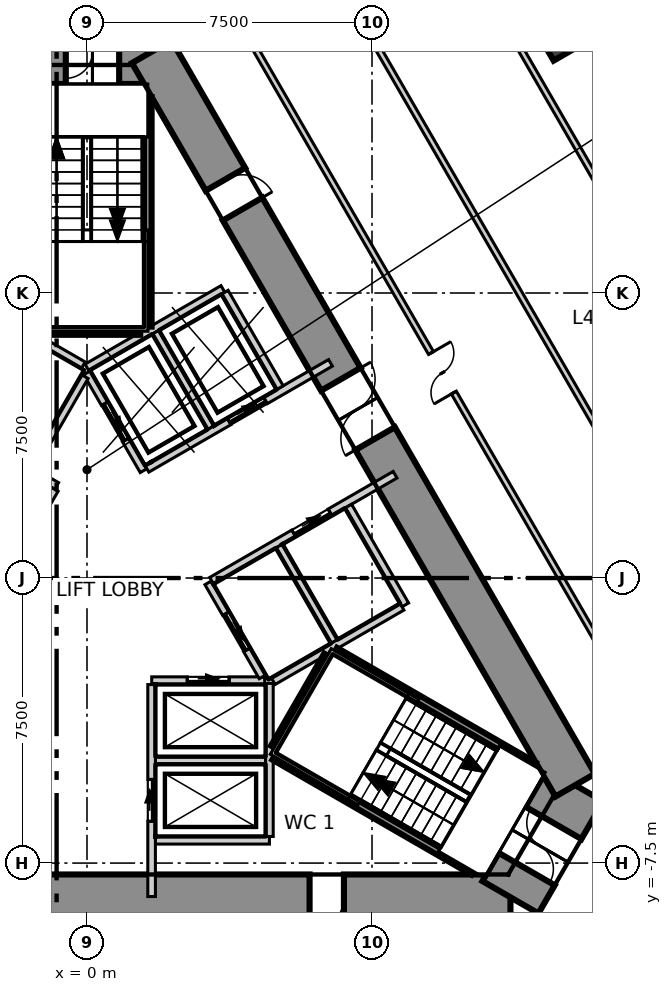
"""IFC4 building model, lengths in metres.
Left out: names, types, materials, properties, quantities, classifications, styles, units other than length and angle.
Written with IfcOpenShell. Run it as: python <this file> out.ifc"""

import sys

from ifc_helpers import new_model, si_unit, direction, frame, frame_2d, origin, origin_2d, place, context, subcontext, project, spatial, polyline, rectangle, outline, extrude, element, fill, save


model = new_model("IFC4")
c1 = context("Model", 3, precision=1e-05, world=origin(), true_north=direction((0.0, 1.0)))
c2 = subcontext(c1, "Body", "Model", "MODEL_VIEW")
j1 = project(units=[si_unit("LENGTHUNIT", "METRE"), si_unit("PLANEANGLEUNIT", "RADIAN")], contexts=[c1])
p1 = place(None, origin())
s1 = spatial("IfcSite", under=j1, at=p1, CompositionType="ELEMENT")
p2 = place(p1, origin())
s2 = spatial("IfcBuilding", under=s1, at=p2, CompositionType="ELEMENT")
p3 = place(p2, frame((0.0, 0.0, 185.3)))
s3 = spatial("IfcBuildingStorey", under=s2, at=p3, CompositionType="ELEMENT", Elevation=185.3)
p4 = place(p3, frame((1.703, 13.85, -0.6), z_axis=(0.0, 0.0, 1.0), x_axis=(-1.0, 0.0, 0.0)))
e1 = element("IfcWall", 1, at=p4, inside=s3, PredefinedType="SHEAR", context=c2, shape_type="SweptSolid", body=[
    extrude(outline(polyline([(-0.202, -0.85), (1.703, -0.85), (3.608, -0.85), (3.204, 0.85), (1.703, 0.85), (0.202, 0.85), (-0.202, -0.85)])), origin(), (0.0, 0.0, 1.0), 6.3),
])
p5 = place(p4, frame((0.859, 0.0, 0.6)))
e2 = element("IfcOpeningElement", 2, at=p5, cuts=e1, PredefinedType="OPENING", context=c2, shape_type="SweptSolid", body=[
    extrude(rectangle(XDim=1.4, YDim=2.1, at=frame_2d((0.7, 1.05))), frame((0.0, 0.86, 0.0), z_axis=(0.0, -1.0, 0.0), x_axis=(1.0, 0.0, 0.0)), (0.0, 0.0, 1.0), 1.72),
])
p6 = place(p3, frame((-11.143, -8.4, -0.6), z_axis=(0.0, 0.0, 1.0), x_axis=(1.0, 0.0, 0.0)))
e3 = element("IfcWall", 3, at=p6, inside=s3, PredefinedType="SHEAR", context=c2, shape_type="SweptSolid", body=[
    extrude(outline(polyline([(-0.635, -0.6), (1.328, -0.6), (3.291, -0.6), (5.254, -0.6), (7.217, -0.6), (9.18, -0.6), (11.143, -0.6), (13.106, -0.6), (15.069, -0.6), (17.032, -0.6), (18.995, -0.6), (20.958, -0.6), (22.921, -0.6), (21.651, 0.6), (19.74, 0.6), (17.83, 0.6), (15.919, 0.6), (14.009, 0.6), (12.098, 0.6), (10.188, 0.6), (8.277, 0.6), (6.367, 0.6), (4.456, 0.6), (2.546, 0.6), (0.635, 0.6), (-0.635, -0.6)])), origin(), (0.0, 0.0, 1.0), 6.3),
])
p7 = place(p6, frame((17.002, 0.0, 0.6)))
e4 = element("IfcOpeningElement", 4, at=p7, cuts=e3, PredefinedType="OPENING", context=c2, shape_type="SweptSolid", body=[
    extrude(rectangle(XDim=0.9, YDim=2.1, at=frame_2d((0.45, 1.05))), frame((0.0, 0.61, 0.0), z_axis=(0.0, -1.0, 0.0), x_axis=(1.0, 0.0, 0.0)), (0.0, 0.0, 1.0), 1.22),
])
p8 = place(p3, frame((11.143, -8.4, -0.6), z_axis=(0.0, 0.0, 1.0), x_axis=(0.499939613464, 0.86606026516, 0.0)))
e5 = element("IfcWall", 5, at=p8, inside=s3, PredefinedType="SHEAR", context=c2, shape_type="SweptSolid", body=[
    extrude(outline(polyline([(-0.202, -0.85), (1.703, -0.85), (3.608, -0.85), (3.204, 0.85), (1.703, 0.85), (0.202, 0.85), (-0.202, -0.85)])), origin(), (0.0, 0.0, 1.0), 6.3),
])
p9 = place(p8, frame((0.859, 0.0, 0.6)))
e6 = element("IfcOpeningElement", 6, at=p9, cuts=e5, PredefinedType="OPENING", context=c2, shape_type="SweptSolid", body=[
    extrude(rectangle(XDim=1.4, YDim=2.1, at=frame_2d((0.7, 1.05))), frame((0.0, 0.86, 0.0), z_axis=(0.0, -1.0, 0.0), x_axis=(1.0, 0.0, 0.0)), (0.0, 0.0, 1.0), 1.72),
])
p10 = place(p3, frame((12.846, -5.45, -0.6), z_axis=(0.0, 0.0, 1.0), x_axis=(-0.500005991004, 0.866021944849, 0.0)))
e7 = element("IfcWall", 7, at=p10, inside=s3, PredefinedType="SHEAR", context=c2, shape_type="SweptSolid", body=[
    extrude(outline(polyline([(-0.635, -0.6), (1.328, -0.6), (3.291, -0.6), (5.254, -0.6), (7.217, -0.6), (9.18, -0.6), (11.143, -0.6), (13.106, -0.6), (15.069, -0.6), (17.032, -0.6), (18.995, -0.6), (20.958, -0.6), (22.921, -0.6), (21.651, 0.6), (19.74, 0.6), (17.83, 0.6), (15.919, 0.6), (14.009, 0.6), (12.098, 0.6), (10.188, 0.6), (8.277, 0.6), (6.367, 0.6), (4.456, 0.6), (2.546, 0.6), (0.635, 0.6), (-0.635, -0.6)])), origin(), (0.0, 0.0, 1.0), 6.3),
])
p11 = place(p10, frame((10.531, 0.0, 0.6)))
e8 = element("IfcOpeningElement", 8, at=p11, cuts=e7, PredefinedType="OPENING", context=c2, shape_type="SweptSolid", body=[
    extrude(rectangle(XDim=1.8, YDim=2.1, at=frame_2d((0.9, 1.05))), frame((0.0, 0.61, 0.0), z_axis=(0.0, -1.0, 0.0), x_axis=(1.0, 0.0, 0.0)), (0.0, 0.0, 1.0), 1.22),
])
p12 = place(p10, frame((17.506, 0.0, 0.6)))
e9 = element("IfcOpeningElement", 9, at=p12, cuts=e7, PredefinedType="OPENING", context=c2, shape_type="SweptSolid", body=[
    extrude(rectangle(XDim=0.9, YDim=2.1, at=frame_2d((0.45, 1.05))), frame((0.0, 0.61, 0.0), z_axis=(0.0, -1.0, 0.0), x_axis=(1.0, 0.0, 0.0)), (0.0, 0.0, 1.0), 1.22),
])
p13 = place(p3, frame((12.387, 14.427, -0.6), z_axis=(0.0, 0.0, 1.0), x_axis=(-0.5, 0.866025403784, 0.0)))
e10 = element("IfcColumn", 10, at=p13, inside=s3, PredefinedType="COLUMN", context=c2, shape_type="SweptSolid", body=[
    extrude(rectangle(XDim=1.3, YDim=1.0, at=origin_2d()), origin(), (0.0, 0.0, 1.0), 6.3),
])
p14 = place(p3, frame((2.98, 28.52, 0.0), z_axis=(0.0, 0.0, 1.0), x_axis=(0.500012382508, -0.866018254622, 0.0)))
e11 = element("IfcWall", 11, at=p14, inside=s3, PredefinedType="PARTITIONING", context=c2, shape_type="SweptSolid", body=[
    extrude(rectangle(XDim=46.505, YDim=0.15, at=frame_2d((23.252, 0.0))), origin(), (0.0, 0.0, 1.0), 5.7),
])
p15 = place(p3, frame((2.944, 16.5, 0.0), z_axis=(0.0, 0.0, 1.0), x_axis=(0.500001499409, -0.866024538099, 0.0)))
e12 = element("IfcWall", 12, at=p15, inside=s3, PredefinedType="PARTITIONING", context=c2, shape_type="SweptSolid", body=[
    extrude(rectangle(XDim=25.548, YDim=0.15, at=frame_2d((12.774, 0.0))), origin(), (0.0, 0.0, 1.0), 5.7),
])
p16 = place(p15, frame((12.217, 0.0, 0.0)))
e13 = element("IfcOpeningElement", 13, at=p16, cuts=e12, PredefinedType="OPENING", context=c2, shape_type="SweptSolid", body=[
    extrude(rectangle(XDim=1.2, YDim=2.1, at=frame_2d((0.6, 1.05))), frame((0.0, 0.085, 0.0), z_axis=(0.0, -1.0, 0.0), x_axis=(1.0, 0.0, 0.0)), (0.0, 0.0, 1.0), 0.17),
])
p17 = place(p3, frame((2.371, 23.093, 0.0), z_axis=(0.0, 0.0, 1.0), x_axis=(0.500006092323, -0.866021886352, 0.0)))
e14 = element("IfcWall", 14, at=p17, inside=s3, PredefinedType="PARTITIONING", context=c2, shape_type="SweptSolid", body=[
    extrude(rectangle(XDim=37.651, YDim=0.15, at=frame_2d((18.826, 0.0))), origin(), (0.0, 0.0, 1.0), 5.7),
])
p18 = place(p3, frame((1.8, -4.8, 0.0), z_axis=(0.0, 0.0, 1.0), x_axis=(1.0, 0.0, 0.0)))
e15 = element("IfcWall", 15, at=p18, inside=s3, PredefinedType="SOLIDWALL", context=c2, shape_type="SweptSolid", body=[
    extrude(rectangle(XDim=2.9, YDim=0.2, at=frame_2d((1.45, 0.0))), origin(), (0.0, 0.0, 1.0), 5.7),
])
p19 = place(p3, frame((1.8, -6.9, 0.0), z_axis=(0.0, 0.0, 1.0), x_axis=(1.0, 0.0, 0.0)))
e16 = element("IfcWall", 16, at=p19, inside=s3, PredefinedType="SOLIDWALL", context=c2, shape_type="SweptSolid", body=[
    extrude(rectangle(XDim=3.0, YDim=0.2, at=frame_2d((1.5, 0.0))), origin(), (0.0, 0.0, 1.0), 5.7),
])
p20 = place(p3, frame((1.703, -2.7, 0.0), z_axis=(0.0, 0.0, 1.0), x_axis=(1.0, 0.0, 0.0)))
e17 = element("IfcWall", 17, at=p20, inside=s3, PredefinedType="SOLIDWALL", context=c2, shape_type="SweptSolid", body=[
    extrude(rectangle(XDim=2.973, YDim=0.2, at=frame_2d((1.487, 0.0))), origin(), (0.0, 0.0, 1.0), 5.7),
])
p21 = place(p20, frame((0.936, 0.0, 0.0)))
e18 = element("IfcOpeningElement", 18, at=p21, cuts=e17, PredefinedType="OPENING", context=c2, shape_type="SweptSolid", body=[
    extrude(rectangle(XDim=1.1, YDim=2.1, at=frame_2d((0.55, 1.05))), frame((0.0, 0.11, 0.0), z_axis=(0.0, -1.0, 0.0), x_axis=(1.0, 0.0, 0.0)), (0.0, 0.0, 1.0), 0.22),
])
p22 = place(p3, frame((-0.002, 5.541, 0.0), z_axis=(0.0, 0.0, 1.0), x_axis=(0.86600155993, 0.500041296494, 0.0)))
e19 = element("IfcWall", 19, at=p22, inside=s3, PredefinedType="SOLIDWALL", context=c2, shape_type="SweptSolid", body=[
    extrude(rectangle(XDim=4.132, YDim=0.2, at=frame_2d((2.066, 0.0))), origin(), (0.0, 0.0, 1.0), 5.7),
])
p23 = place(p3, frame((0.0, 5.4, 0.0), z_axis=(0.0, 0.0, 1.0), x_axis=(0.500103862429, -0.865965430478, 0.0)))
e20 = element("IfcWall", 20, at=p23, inside=s3, PredefinedType="SOLIDWALL", context=c2, shape_type="SweptSolid", body=[
    extrude(rectangle(XDim=2.973, YDim=0.2, at=frame_2d((1.487, 0.0))), origin(), (0.0, 0.0, 1.0), 5.7),
])
p24 = place(p23, frame((0.937, 0.0, 0.0)))
e21 = element("IfcOpeningElement", 21, at=p24, cuts=e20, PredefinedType="OPENING", context=c2, shape_type="SweptSolid", body=[
    extrude(rectangle(XDim=1.1, YDim=2.1, at=frame_2d((0.55, 1.05))), frame((0.0, 0.11, 0.0), z_axis=(0.0, -1.0, 0.0), x_axis=(1.0, 0.0, 0.0)), (0.0, 0.0, 1.0), 0.22),
])
p25 = place(p3, frame((3.19, -0.125, 0.0), z_axis=(0.0, 0.0, 1.0), x_axis=(0.499988658015, -0.866031951983, 0.0)))
e22 = element("IfcWall", 22, at=p25, inside=s3, PredefinedType="SOLIDWALL", context=c2, shape_type="SweptSolid", body=[
    extrude(rectangle(XDim=2.858, YDim=0.2, at=frame_2d((1.429, 0.0))), origin(), (0.0, 0.0, 1.0), 5.7),
])
p26 = place(p25, frame((0.936, 0.0, 0.0)))
e23 = element("IfcOpeningElement", 23, at=p26, cuts=e22, PredefinedType="OPENING", context=c2, shape_type="SweptSolid", body=[
    extrude(rectangle(XDim=1.1, YDim=2.1, at=frame_2d((0.55, 1.05))), frame((0.0, 0.11, 0.0), z_axis=(0.0, -1.0, 0.0), x_axis=(1.0, 0.0, 0.0)), (0.0, 0.0, 1.0), 0.22),
])
p27 = place(p3, frame((1.577, 2.874, 0.0), z_axis=(0.0, 0.0, 1.0), x_axis=(0.866068955414, 0.499924558776, 0.0)))
e24 = element("IfcWall", 24, at=p27, inside=s3, PredefinedType="SOLIDWALL", context=c2, shape_type="SweptSolid", body=[
    extrude(rectangle(XDim=5.577, YDim=0.2, at=frame_2d((2.789, 0.0))), origin(), (0.0, 0.0, 1.0), 5.7),
])
p28 = place(p27, frame((2.497, 0.0, 0.0)))
e25 = element("IfcOpeningElement", 25, at=p28, cuts=e24, PredefinedType="OPENING", context=c2, shape_type="SweptSolid", body=[
    extrude(rectangle(XDim=1.1, YDim=2.1, at=frame_2d((0.55, 1.05))), frame((0.0, 0.11, 0.0), z_axis=(0.0, -1.0, 0.0), x_axis=(1.0, 0.0, 0.0)), (0.0, 0.0, 1.0), 0.22),
])
p29 = place(p3, frame((1.7, -8.38, 0.0), z_axis=(0.0, 0.0, 1.0), x_axis=(0.0, 1.0, 0.0)))
e26 = element("IfcWall", 26, at=p29, inside=s3, PredefinedType="SOLIDWALL", context=c2, shape_type="SweptSolid", body=[
    extrude(rectangle(XDim=5.577, YDim=0.2, at=frame_2d((2.789, 0.0))), origin(), (0.0, 0.0, 1.0), 5.7),
])
p30 = place(p29, frame((1.98, 0.0, 0.0)))
e27 = element("IfcOpeningElement", 27, at=p30, cuts=e26, PredefinedType="OPENING", context=c2, shape_type="SweptSolid", body=[
    extrude(rectangle(XDim=1.1, YDim=2.1, at=frame_2d((0.55, 1.05))), frame((0.0, 0.11, 0.0), z_axis=(0.0, -1.0, 0.0), x_axis=(1.0, 0.0, 0.0)), (0.0, 0.0, 1.0), 0.22),
])
p31 = place(p3, frame((4.8, -6.8, 0.0), z_axis=(0.0, 0.0, 1.0), x_axis=(0.0, 1.0, 0.0)))
e28 = element("IfcWall", 28, at=p31, inside=s3, PredefinedType="SOLIDWALL", context=c2, shape_type="SweptSolid", body=[
    extrude(rectangle(XDim=4.029, YDim=0.2, at=frame_2d((2.015, 0.0))), origin(), (0.0, 0.0, 1.0), 5.7),
])
p32 = place(p3, frame((3.278, -0.071, 0.0), z_axis=(0.0, 0.0, 1.0), x_axis=(0.865938393773, 0.500150675487, 0.0)))
e29 = element("IfcWall", 29, at=p32, inside=s3, PredefinedType="SOLIDWALL", context=c2, shape_type="SweptSolid", body=[
    extrude(rectangle(XDim=5.576, YDim=0.2, at=frame_2d((2.788, 0.0))), origin(), (0.0, 0.0, 1.0), 5.7),
])
p33 = place(p32, frame((2.497, 0.0, 0.0)))
e30 = element("IfcOpeningElement", 30, at=p33, cuts=e29, PredefinedType="OPENING", context=c2, shape_type="SweptSolid", body=[
    extrude(rectangle(XDim=1.1, YDim=2.1, at=frame_2d((0.55, 1.05))), frame((0.0, 0.11, 0.0), z_axis=(0.0, -1.0, 0.0), x_axis=(1.0, 0.0, 0.0)), (0.0, 0.0, 1.0), 0.22),
])
p34 = place(p3, frame((3.626, 7.52, 0.0), z_axis=(0.0, 0.0, 1.0), x_axis=(0.500060147554, -0.865990674793, 0.0)))
e31 = element("IfcWall", 31, at=p34, inside=s3, PredefinedType="SOLIDWALL", context=c2, shape_type="SweptSolid", body=[
    extrude(rectangle(XDim=2.9, YDim=0.2, at=frame_2d((1.45, 0.0))), origin(), (0.0, 0.0, 1.0), 5.7),
])
p35 = place(p3, frame((6.876, 1.891, 0.0), z_axis=(0.0, 0.0, 1.0), x_axis=(0.499990139034, -0.866031096941, 0.0)))
e32 = element("IfcWall", 32, at=p35, inside=s3, PredefinedType="SOLIDWALL", context=c2, shape_type="SweptSolid", body=[
    extrude(rectangle(XDim=3.0, YDim=0.2, at=frame_2d((1.5, 0.0))), origin(), (0.0, 0.0, 1.0), 5.7),
])
for number, where, z_axis, x_axis in (
    (33, (1.807, 6.47, 0.0), (0.0, 0.0, 1.0), (0.5, -0.866, 0.0)),
    (34, (5.057, 0.841, 0.0), (0.0, 0.0, 1.0), (0.5, -0.866, 0.0)),
):
    element("IfcWall", number, at=place(p3, frame(where, z_axis=z_axis, x_axis=x_axis)), inside=s3, PredefinedType="SOLIDWALL", context=c2, shape_type="SweptSolid", body=[
        extrude(rectangle(XDim=2.9, YDim=0.2, at=frame_2d((1.45, 0.0))), origin(), (0.0, 0.0, 1.0), 5.7),
    ])
p36 = place(p3, frame((4.9, -2.714, 0.0), z_axis=(0.0, 0.0, 1.0), x_axis=(0.865992350556, 0.500057245502, 0.0)))
e35 = element("IfcWall", 35, at=p36, inside=s3, PredefinedType="SOLIDWALL", context=c2, shape_type="SweptSolid", body=[
    extrude(rectangle(XDim=3.914, YDim=0.2, at=frame_2d((1.957, 0.0))), origin(), (0.0, 0.0, 1.0), 5.7),
])
p37 = place(p3, frame((-1.488, 2.822, 0.0), z_axis=(0.0, 0.0, 1.0), x_axis=(0.866236612152, -0.499633997809, 0.0)))
e36 = element("IfcWall", 36, at=p37, inside=s3, PredefinedType="SOLIDWALL", context=c2, shape_type="SweptSolid", body=[
    extrude(rectangle(XDim=0.796, YDim=0.2, at=frame_2d((0.398, 0.0))), origin(), (0.0, 0.0, 1.0), 5.7),
])
p38 = place(p3, frame((-2.444, -0.433, 0.0), z_axis=(0.0, 0.0, 1.0), x_axis=(0.500035624827, 0.866004834804, 0.0)))
e37 = element("IfcWall", 37, at=p38, inside=s3, PredefinedType="SOLIDWALL", context=c2, shape_type="SweptSolid", body=[
    extrude(rectangle(XDim=3.194, YDim=0.2, at=frame_2d((1.597, 0.0))), origin(), (0.0, 0.0, 1.0), 5.7),
])
p39 = place(p3, frame((-1.67, 6.507, 0.0), z_axis=(0.0, 0.0, 1.0), x_axis=(0.865941441609, -0.500145398563, 0.0)))
e38 = element("IfcWall", 38, at=p39, inside=s3, PredefinedType="SOLIDWALL", context=c2, shape_type="SweptSolid", body=[
    extrude(rectangle(XDim=1.815, YDim=0.2, at=frame_2d((0.908, 0.0))), origin(), (0.0, 0.0, 1.0), 5.7),
])
p40 = place(p3, frame((-1.438, 2.909, 0.0), z_axis=(0.0, 0.0, 1.0), x_axis=(0.499829630636, 0.866123744241, 0.0)))
e39 = element("IfcWall", 39, at=p40, inside=s3, PredefinedType="SOLIDWALL", context=c2, shape_type="SweptSolid", body=[
    extrude(rectangle(XDim=2.761, YDim=0.2, at=frame_2d((1.38, 0.0))), origin(), (0.0, 0.0, 1.0), 5.7),
])
p41 = place(p3, frame((1.6, 6.615, 0.0), z_axis=(0.0, 0.0, 1.0), x_axis=(0.0, 1.0, 0.0)))
e40 = element("IfcWall", 40, at=p41, inside=s3, PredefinedType="SOLIDWALL", context=c2, shape_type="SweptSolid", body=[
    extrude(rectangle(XDim=6.04, YDim=0.2, at=frame_2d((3.02, 0.0))), origin(), (0.0, 0.0, 1.0), 5.7),
])
p42 = place(p3, frame((-1.4, 6.5, 0.0), z_axis=(0.0, 0.0, 1.0), x_axis=(1.0, 0.0, 0.0)))
e41 = element("IfcWall", 41, at=p42, inside=s3, PredefinedType="SOLIDWALL", context=c2, shape_type="SweptSolid", body=[
    extrude(rectangle(XDim=2.8, YDim=0.2, at=frame_2d((1.4, 0.0))), origin(), (0.0, 0.0, 1.0), 5.7),
])
p43 = place(p3, frame((4.929, -4.693, 0.0), z_axis=(0.0, 0.0, 1.0), x_axis=(0.866048276411, -0.499960381356, 0.0)))
e42 = element("IfcWall", 42, at=p43, inside=s3, PredefinedType="SOLIDWALL", context=c2, shape_type="SweptSolid", body=[
    extrude(rectangle(XDim=6.04, YDim=0.2, at=frame_2d((3.02, 0.0))), origin(), (0.0, 0.0, 1.0), 5.7),
])
p44 = place(p3, frame((4.929, -4.462, 0.0), z_axis=(0.0, 0.0, 1.0), x_axis=(0.500200581029, 0.865909567298, 0.0)))
e43 = element("IfcWall", 43, at=p44, inside=s3, PredefinedType="SOLIDWALL", context=c2, shape_type="SweptSolid", body=[
    extrude(rectangle(XDim=2.799, YDim=0.2, at=frame_2d((1.399, 0.0))), origin(), (0.0, 0.0, 1.0), 5.7),
])
p45 = place(p3, frame((6.529, -1.922, 0.0), z_axis=(0.0, 0.0, 1.0), x_axis=(0.866048276411, -0.499960381356, 0.0)))
e44 = element("IfcWall", 44, at=p45, inside=s3, PredefinedType="SOLIDWALL", context=c2, shape_type="SweptSolid", body=[
    extrude(rectangle(XDim=6.04, YDim=0.2, at=frame_2d((3.02, 0.0))), origin(), (0.0, 0.0, 1.0), 5.7),
])
p46 = place(p26, origin())
e45 = element("IfcDoor", 45, at=p46, inside=s3, OperationType="SLIDING_TO_LEFT", PredefinedType="DOOR", context=c2, shape_type="SweptSolid", body=[
    extrude(rectangle(XDim=1.1, YDim=2.1, at=frame_2d((0.55, 1.05))), frame((0.0, 0.025, 0.0), z_axis=(0.0, -1.0, 0.0), x_axis=(1.0, 0.0, 0.0)), (0.0, 0.0, 1.0), 0.05),
])
fill(e23, e45)
p47 = place(p33, origin())
e46 = element("IfcDoor", 46, at=p47, inside=s3, OperationType="SLIDING_TO_LEFT", PredefinedType="DOOR", context=c2, shape_type="SweptSolid", body=[
    extrude(rectangle(XDim=1.1, YDim=2.1, at=frame_2d((0.55, 1.05))), frame((0.0, 0.025, 0.0), z_axis=(0.0, -1.0, 0.0), x_axis=(1.0, 0.0, 0.0)), (0.0, 0.0, 1.0), 0.05),
])
fill(e30, e46)
p48 = place(p21, origin())
e47 = element("IfcDoor", 47, at=p48, inside=s3, OperationType="SLIDING_TO_LEFT", PredefinedType="DOOR", context=c2, shape_type="SweptSolid", body=[
    extrude(rectangle(XDim=1.1, YDim=2.1, at=frame_2d((0.55, 1.05))), frame((0.0, 0.025, 0.0), z_axis=(0.0, -1.0, 0.0), x_axis=(1.0, 0.0, 0.0)), (0.0, 0.0, 1.0), 0.05),
])
fill(e18, e47)
p49 = place(p30, origin())
e48 = element("IfcDoor", 48, at=p49, inside=s3, OperationType="SLIDING_TO_LEFT", PredefinedType="DOOR", context=c2, shape_type="SweptSolid", body=[
    extrude(rectangle(XDim=1.1, YDim=2.1, at=frame_2d((0.55, 1.05))), frame((0.0, 0.025, 0.0), z_axis=(0.0, -1.0, 0.0), x_axis=(1.0, 0.0, 0.0)), (0.0, 0.0, 1.0), 0.05),
])
fill(e27, e48)
p50 = place(p24, origin())
e49 = element("IfcDoor", 49, at=p50, inside=s3, OperationType="SLIDING_TO_LEFT", PredefinedType="DOOR", context=c2, shape_type="SweptSolid", body=[
    extrude(rectangle(XDim=1.1, YDim=2.1, at=frame_2d((0.55, 1.05))), frame((0.0, 0.025, 0.0), z_axis=(0.0, -1.0, 0.0), x_axis=(1.0, 0.0, 0.0)), (0.0, 0.0, 1.0), 0.05),
])
fill(e21, e49)
p51 = place(p28, origin())
e50 = element("IfcDoor", 50, at=p51, inside=s3, OperationType="SLIDING_TO_LEFT", PredefinedType="DOOR", context=c2, shape_type="SweptSolid", body=[
    extrude(rectangle(XDim=1.1, YDim=2.1, at=frame_2d((0.55, 1.05))), frame((0.0, 0.025, 0.0), z_axis=(0.0, -1.0, 0.0), x_axis=(1.0, 0.0, 0.0)), (0.0, 0.0, 1.0), 0.05),
])
fill(e25, e50)
p52 = place(p16, origin())
e51 = element("IfcDoor", 51, at=p52, inside=s3, OperationType="DOUBLE_DOOR_SINGLE_SWING", PredefinedType="DOOR", context=c2, shape_type="SweptSolid", body=[
    extrude(rectangle(XDim=1.2, YDim=2.1, at=frame_2d((0.6, 1.05))), frame((0.0, 0.025, 0.0), z_axis=(0.0, -1.0, 0.0), x_axis=(1.0, 0.0, 0.0)), (0.0, 0.0, 1.0), 0.05),
])
fill(e13, e51)
p53 = place(p11, origin())
e52 = element("IfcDoor", 52, at=p53, inside=s3, OperationType="DOUBLE_DOOR_SINGLE_SWING", PredefinedType="DOOR", context=c2, shape_type="SweptSolid", body=[
    extrude(rectangle(XDim=1.8, YDim=2.1, at=frame_2d((0.9, 1.05))), frame((0.0, 0.025, 0.0), z_axis=(0.0, -1.0, 0.0), x_axis=(1.0, 0.0, 0.0)), (0.0, 0.0, 1.0), 0.05),
])
fill(e8, e52)
p54 = place(p5, origin())
e53 = element("IfcDoor", 53, at=p54, inside=s3, OperationType="DOUBLE_DOOR_SINGLE_SWING", PredefinedType="DOOR", context=c2, shape_type="SweptSolid", body=[
    extrude(rectangle(XDim=1.4, YDim=2.1, at=frame_2d((0.7, 1.05))), frame((0.0, 0.025, 0.0), z_axis=(0.0, -1.0, 0.0), x_axis=(1.0, 0.0, 0.0)), (0.0, 0.0, 1.0), 0.05),
])
fill(e2, e53)
p55 = place(p9, origin())
e54 = element("IfcDoor", 54, at=p55, inside=s3, OperationType="DOUBLE_DOOR_SINGLE_SWING", PredefinedType="DOOR", context=c2, shape_type="SweptSolid", body=[
    extrude(rectangle(XDim=1.4, YDim=2.1, at=frame_2d((0.7, 1.05))), frame((0.0, 0.025, 0.0), z_axis=(0.0, -1.0, 0.0), x_axis=(1.0, 0.0, 0.0)), (0.0, 0.0, 1.0), 0.05),
])
fill(e6, e54)
p56 = place(p7, origin())
e55 = element("IfcDoor", 55, at=p56, inside=s3, OperationType="SINGLE_SWING_LEFT", PredefinedType="DOOR", context=c2, shape_type="SweptSolid", body=[
    extrude(rectangle(XDim=0.9, YDim=2.1, at=frame_2d((0.45, 1.05))), frame((0.0, 0.325, 0.0), z_axis=(0.0, -1.0, 0.0), x_axis=(1.0, 0.0, 0.0)), (0.0, 0.0, 1.0), 0.05),
])
fill(e4, e55)
p57 = place(p12, origin())
e56 = element("IfcDoor", 56, at=p57, inside=s3, OperationType="SINGLE_SWING_LEFT", PredefinedType="DOOR", context=c2, shape_type="SweptSolid", body=[
    extrude(rectangle(XDim=0.9, YDim=2.1, at=frame_2d((0.45, 1.05))), frame((0.0, 0.025, 0.0), z_axis=(0.0, -1.0, 0.0), x_axis=(1.0, 0.0, 0.0)), (0.0, 0.0, 1.0), 0.05),
])
fill(e9, e56)
save(model, sys.argv[1])
